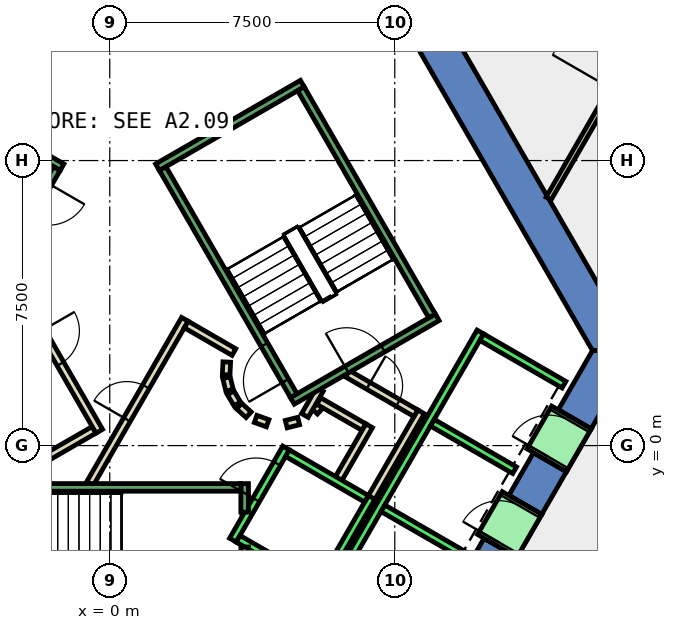
"""IFC4 building model, lengths in metres.
Left out: names, types, materials, properties, quantities, classifications, styles, units other than length and angle.
Written with IfcOpenShell. Run it as: python <this file> out.ifc"""

import sys

from ifc_helpers import new_model, si_unit, direction, frame, frame_2d, origin, place, context, subcontext, project, spatial, polyline, rectangle, outline, extrude, element, fill, save


model = new_model("IFC4")
c1 = context("Model", 3, precision=1e-05, world=origin(), true_north=direction((0.0, 1.0)))
c2 = subcontext(c1, "Body", "Model", "MODEL_VIEW")
j1 = project(units=[si_unit("LENGTHUNIT", "METRE"), si_unit("PLANEANGLEUNIT", "RADIAN")], contexts=[c1])
p1 = place(None, origin())
s1 = spatial("IfcSite", under=j1, at=p1, CompositionType="ELEMENT")
p2 = place(p1, origin())
s2 = spatial("IfcBuilding", under=s1, at=p2, CompositionType="ELEMENT")
p3 = place(p2, frame((0.0, 0.0, 30.0)))
s3 = spatial("IfcBuildingStorey", under=s2, at=p3, CompositionType="ELEMENT", Elevation=30.0)
p4 = place(p3, frame((0.0, 0.0, -0.45)))
e1 = element("IfcWall", 1, at=p4, inside=s3, PredefinedType="SHEAR", context=c2, shape_type="SweptSolid", body=[
    extrude(outline(polyline([(8.517, 11.748), (7.651, 11.248), (12.702, 2.5), (13.856, 2.5), (8.517, 11.748)])), origin(), (0.0, 0.0, 1.0), 4.85),
])
p5 = place(p3, frame((0.0, 0.0, -0.45)))
e2 = element("IfcWall", 2, at=p5, inside=s3, PredefinedType="SHEAR", context=c2, shape_type="SweptSolid", body=[
    extrude(outline(polyline([(10.717, -2.937), (9.851, -2.437), (9.201, -3.563), (10.067, -4.063), (10.717, -2.937)])), origin(), (0.0, 0.0, 1.0), 4.85),
])
p6 = place(p3, frame((0.0, 0.0, -0.45)))
e3 = element("IfcWall", 3, at=p6, inside=s3, PredefinedType="SHEAR", context=c2, shape_type="SweptSolid", body=[
    extrude(outline(polyline([(12.017, -0.686), (11.151, -0.186), (10.501, -1.311), (11.367, -1.811), (12.017, -0.686)])), origin(), (0.0, 0.0, 1.0), 4.85),
])
p7 = place(p3, frame((0.0, 0.0, -0.45)))
e4 = element("IfcWall", 4, at=p7, inside=s3, PredefinedType="SHEAR", context=c2, shape_type="SweptSolid", body=[
    extrude(outline(polyline([(11.801, 0.94), (12.667, 0.44), (13.856, 2.5), (12.702, 2.5), (11.801, 0.94)])), origin(), (0.0, 0.0, 1.0), 4.85),
])
p8 = place(p3, frame((0.0, 0.0, 3.6)))
e5 = element("IfcWall", 5, at=p8, inside=s3, PredefinedType="SHEAR", context=c2, shape_type="SweptSolid", body=[
    extrude(outline(polyline([(11.367, -1.811), (10.501, -1.311), (9.851, -2.437), (10.717, -2.937), (11.367, -1.811)])), origin(), (0.0, 0.0, 1.0), 0.8),
])
p9 = place(p3, frame((0.0, 0.0, 3.6)))
e6 = element("IfcWall", 6, at=p9, inside=s3, PredefinedType="SHEAR", context=c2, shape_type="SweptSolid", body=[
    extrude(outline(polyline([(12.667, 0.44), (11.801, 0.94), (11.151, -0.186), (12.017, -0.686), (12.667, 0.44)])), origin(), (0.0, 0.0, 1.0), 0.8),
])
p10 = place(p3, frame((5.39, 0.898, 0.0), z_axis=(0.0, 0.0, 1.0), x_axis=(0.673828488714, 0.738887791073, 0.0)))
e7 = element("IfcWall", 7, at=p10, inside=s3, PredefinedType="PARTITIONING", context=c2, shape_type="SweptSolid", body=[
    extrude(rectangle(XDim=0.263, YDim=0.2, at=frame_2d((0.131, 0.0))), origin(), (0.0, 0.0, 1.0), 4.4),
])
p11 = place(p3, frame((5.499, 1.172, 0.0), z_axis=(0.0, 0.0, 1.0), x_axis=(0.866333505267, -0.499465972466, 0.0)))
e8 = element("IfcWall", 8, at=p11, inside=s3, PredefinedType="PARTITIONING", context=c2, shape_type="SweptSolid", body=[
    extrude(rectangle(XDim=1.374, YDim=0.2, at=frame_2d((0.687, 0.0))), origin(), (0.0, 0.0, 1.0), 4.4),
])
p12 = place(p3, frame((6.826, 0.522, 0.0), z_axis=(0.0, 0.0, 1.0), x_axis=(-0.500016722714, -0.866015748706, 0.0)))
e9 = element("IfcWall", 9, at=p12, inside=s3, PredefinedType="PARTITIONING", context=c2, shape_type="SweptSolid", body=[
    extrude(rectangle(XDim=1.7, YDim=0.2, at=frame_2d((0.85, 0.0))), origin(), (0.0, 0.0, 1.0), 4.4),
])
p13 = place(p3, frame((8.192, 0.888, 0.0), z_axis=(0.0, 0.0, 1.0), x_axis=(-0.499940625693, -0.866059680843, 0.0)))
e10 = element("IfcWall", 10, at=p13, inside=s3, PredefinedType="PARTITIONING", context=c2, shape_type="SweptSolid", body=[
    extrude(rectangle(XDim=2.68, YDim=0.2, at=frame_2d((1.34, 0.0))), origin(), (0.0, 0.0, 1.0), 4.4),
])
p14 = place(p3, frame((5.135, 0.793, 0.0), z_axis=(0.0, 0.0, 1.0), x_axis=(0.499526442893, 0.866298639529, 0.0)))
e11 = element("IfcWall", 11, at=p14, inside=s3, PredefinedType="PARTITIONING", context=c2, shape_type="SweptSolid", body=[
    extrude(rectangle(XDim=0.791, YDim=0.2, at=frame_2d((0.396, 0.0))), origin(), (0.0, 0.0, 1.0), 4.4),
])
p15 = place(p3, frame((6.25, 1.894, 0.0), z_axis=(0.0, 0.0, 1.0), x_axis=(0.866043184279, -0.499969202016, 0.0)))
e12 = element("IfcWall", 12, at=p15, inside=s3, PredefinedType="PARTITIONING", context=c2, shape_type="SweptSolid", body=[
    extrude(rectangle(XDim=2.084, YDim=0.2, at=frame_2d((1.042, 0.0))), origin(), (0.0, 0.0, 1.0), 4.4),
])
p16 = place(p15, frame((0.642, 0.0, 0.0)))
e13 = element("IfcOpeningElement", 13, at=p16, cuts=e12, PredefinedType="OPENING", context=c2, shape_type="SweptSolid", body=[
    extrude(rectangle(XDim=0.9, YDim=2.1, at=frame_2d((0.45, 1.05))), frame((0.0, 0.11, 0.0), z_axis=(0.0, -1.0, 0.0), x_axis=(1.0, 0.0, 0.0)), (0.0, 0.0, 1.0), 0.22),
])
p17 = place(p3, frame((3.079, 2.199, 0.0), z_axis=(0.0, 0.0, 1.0), x_axis=(-0.047771483479, -0.998858290933, 0.0)))
e14 = element("IfcWall", 14, at=p17, inside=s3, PredefinedType="PARTITIONING", context=c2, shape_type="SweptSolid", body=[
    extrude(rectangle(XDim=0.337, YDim=0.2, at=frame_2d((0.169, 0.0))), origin(), (0.0, 0.0, 1.0), 4.4),
])
p18 = place(p3, frame((3.07, 1.786, 0.0), z_axis=(0.0, 0.0, 1.0), x_axis=(0.242705583207, -0.970099994784, 0.0)))
e15 = element("IfcWall", 15, at=p18, inside=s3, PredefinedType="PARTITIONING", context=c2, shape_type="SweptSolid", body=[
    extrude(rectangle(XDim=0.338, YDim=0.2, at=frame_2d((0.169, 0.0))), origin(), (0.0, 0.0, 1.0), 4.4),
])
for number, where, z_axis, x_axis in (
    (16, (3.182, 1.388, 0.0), (0.0, 0.0, 1.0), (0.512, -0.859, 0.0)),
    (17, (3.404, 1.039, 0.0), (0.0, 0.0, 1.0), (0.74, -0.672, 0.0)),
):
    element("IfcWall", number, at=place(p3, frame(where, z_axis=z_axis, x_axis=x_axis)), inside=s3, PredefinedType="PARTITIONING", context=c2, shape_type="SweptSolid", body=[
        extrude(rectangle(XDim=0.338, YDim=0.2, at=frame_2d((0.169, 0.0))), origin(), (0.0, 0.0, 1.0), 4.4),
    ])
p19 = place(p3, frame((3.838, 0.702, 0.0), z_axis=(0.0, 0.0, 1.0), x_axis=(0.941035081519, -0.338308993895, 0.0)))
e18 = element("IfcWall", 18, at=p19, inside=s3, PredefinedType="PARTITIONING", context=c2, shape_type="SweptSolid", body=[
    extrude(rectangle(XDim=0.337, YDim=0.2, at=frame_2d((0.168, 0.0))), origin(), (0.0, 0.0, 1.0), 4.4),
])
p20 = place(p3, frame((4.644, 0.564, 0.0), z_axis=(0.0, 0.0, 1.0), x_axis=(0.969929076366, 0.243387729394, 0.0)))
e19 = element("IfcWall", 19, at=p20, inside=s3, PredefinedType="PARTITIONING", context=c2, shape_type="SweptSolid", body=[
    extrude(rectangle(XDim=0.337, YDim=0.2, at=frame_2d((0.168, 0.0))), origin(), (0.0, 0.0, 1.0), 4.4),
])
p21 = place(p3, frame((-0.52, -1.0, 0.0), z_axis=(0.0, 0.0, 1.0), x_axis=(0.50011622646, 0.865958290007, 0.0)))
e20 = element("IfcWall", 20, at=p21, inside=s3, PredefinedType="PARTITIONING", context=c2, shape_type="SweptSolid", body=[
    extrude(rectangle(XDim=4.991, YDim=0.2, at=frame_2d((2.496, 0.0))), origin(), (0.0, 0.0, 1.0), 4.4),
])
p22 = place(p21, frame((1.945, 0.0, 0.0)))
e21 = element("IfcOpeningElement", 21, at=p22, cuts=e20, PredefinedType="OPENING", context=c2, shape_type="SweptSolid", body=[
    extrude(rectangle(XDim=1.0, YDim=2.1, at=frame_2d((0.5, 1.05))), frame((0.0, 0.11, 0.0), z_axis=(0.0, -1.0, 0.0), x_axis=(1.0, 0.0, 0.0)), (0.0, 0.0, 1.0), 0.22),
])
p23 = place(p3, frame((2.012, 3.186, 0.0), z_axis=(0.0, 0.0, 1.0), x_axis=(0.865891012941, -0.500232699559, 0.0)))
e22 = element("IfcWall", 22, at=p23, inside=s3, PredefinedType="PARTITIONING", context=c2, shape_type="SweptSolid", body=[
    extrude(rectangle(XDim=1.449, YDim=0.2, at=frame_2d((0.725, 0.0))), origin(), (0.0, 0.0, 1.0), 4.4),
])
p24 = place(p3, frame((-0.412, 0.414, 0.0), z_axis=(0.0, 0.0, 1.0), x_axis=(-0.866017369001, -0.500013916395, 0.0)))
e23 = element("IfcWall", 23, at=p24, inside=s3, PredefinedType="PARTITIONING", context=c2, shape_type="SweptSolid", body=[
    extrude(rectangle(XDim=1.45, YDim=0.2, at=frame_2d((0.725, 0.0))), origin(), (0.0, 0.0, 1.0), 4.4),
])
p25 = place(p3, frame((-2.771, 4.7, 0.0), z_axis=(0.0, 0.0, 1.0), x_axis=(0.499969479948, -0.866043023828, 0.0)))
e24 = element("IfcWall", 24, at=p25, inside=s3, PredefinedType="PARTITIONING", context=c2, shape_type="SweptSolid", body=[
    extrude(rectangle(XDim=4.99, YDim=0.2, at=frame_2d((2.495, 0.0))), origin(), (0.0, 0.0, 1.0), 4.4),
])
p26 = place(p25, frame((1.945, 0.0, 0.0)))
e25 = element("IfcOpeningElement", 25, at=p26, cuts=e24, PredefinedType="OPENING", context=c2, shape_type="SweptSolid", body=[
    extrude(rectangle(XDim=1.0, YDim=2.1, at=frame_2d((0.5, 1.05))), frame((0.0, 0.11, 0.0), z_axis=(0.0, -1.0, 0.0), x_axis=(1.0, 0.0, 0.0)), (0.0, 0.0, 1.0), 0.22),
])
p27 = place(p3, frame((11.547, 6.5, 0.0), z_axis=(0.0, 0.0, 1.0), x_axis=(0.500020059357, 0.866013822199, 0.0)))
e26 = element("IfcWall", 26, at=p27, inside=s3, PredefinedType="PARTITIONING", context=c2, shape_type="SweptSolid", body=[
    extrude(rectangle(XDim=8.356, YDim=0.15, at=frame_2d((4.178, 0.0))), origin(), (0.0, 0.0, 1.0), 4.4),
])
p28 = place(p27, frame((3.33, 0.0, 0.0)))
e27 = element("IfcOpeningElement", 27, at=p28, cuts=e26, PredefinedType="OPENING", context=c2, shape_type="SweptSolid", body=[
    extrude(rectangle(XDim=1.8, YDim=2.1, at=frame_2d((0.9, 1.05))), frame((0.0, 0.085, 0.0), z_axis=(0.0, -1.0, 0.0), x_axis=(1.0, 0.0, 0.0)), (0.0, 0.0, 1.0), 0.17),
])
p29 = place(p3, frame((3.24, -2.488, 0.0), z_axis=(0.0, 0.0, 1.0), x_axis=(0.49994636267, 0.866056369097, 0.0)))
e28 = element("IfcWall", 28, at=p29, inside=s3, PredefinedType="STANDARD", context=c2, shape_type="SweptSolid", body=[
    extrude(rectangle(XDim=2.8, YDim=0.2, at=frame_2d((1.4, 0.0))), origin(), (0.0, 0.0, 1.0), 4.4),
])
p30 = place(p29, frame((1.225, 0.0, 0.0)))
e29 = element("IfcOpeningElement", 29, at=p30, cuts=e28, PredefinedType="OPENING", context=c2, shape_type="SweptSolid", body=[
    extrude(rectangle(XDim=1.1, YDim=2.1, at=frame_2d((0.55, 1.05))), frame((0.0, 0.11, 0.0), z_axis=(0.0, -1.0, 0.0), x_axis=(1.0, 0.0, 0.0)), (0.0, 0.0, 1.0), 0.22),
])
p31 = place(p3, frame((5.492, -3.788, 0.0), z_axis=(0.0, 0.0, 1.0), x_axis=(0.500011755427, 0.866018616679, 0.0)))
e30 = element("IfcWall", 30, at=p31, inside=s3, PredefinedType="STANDARD", context=c2, shape_type="SweptSolid", body=[
    extrude(rectangle(XDim=2.8, YDim=0.2, at=frame_2d((1.4, 0.0))), origin(), (0.0, 0.0, 1.0), 4.4),
])
p32 = place(p3, frame((3.377, -2.452, 0.0), z_axis=(0.0, 0.0, 1.0), x_axis=(0.865955154139, -0.50012165622, 0.0)))
e31 = element("IfcWall", 31, at=p32, inside=s3, PredefinedType="STANDARD", context=c2, shape_type="SweptSolid", body=[
    extrude(rectangle(XDim=2.4, YDim=0.2, at=frame_2d((1.2, 0.0))), origin(), (0.0, 0.0, 1.0), 4.4),
])
p33 = place(p3, frame((4.677, -0.2, 0.0), z_axis=(0.0, 0.0, 1.0), x_axis=(0.865973769406, -0.500089422704, 0.0)))
e32 = element("IfcWall", 32, at=p33, inside=s3, PredefinedType="STANDARD", context=c2, shape_type="SweptSolid", body=[
    extrude(rectangle(XDim=2.399, YDim=0.2, at=frame_2d((1.2, 0.0))), origin(), (0.0, 0.0, 1.0), 4.4),
])
p34 = place(p3, frame((4.451, -6.19, 0.0), z_axis=(0.0, 0.0, 1.0), x_axis=(0.50000090737, 0.866024879913, 0.0)))
e33 = element("IfcWall", 33, at=p34, inside=s3, PredefinedType="STANDARD", context=c2, shape_type="SweptSolid", body=[
    extrude(rectangle(XDim=10.6, YDim=0.2, at=frame_2d((5.3, 0.0))), origin(), (0.0, 0.0, 1.0), 4.4),
])
for number, where, z_axis, x_axis in (
    (34, (7.188, -1.65, 0.0), (0.0, 0.0, 1.0), (0.866, -0.5, 0.0)),
    (35, (8.488, 0.602, 0.0), (0.0, 0.0, 1.0), (0.866, -0.5, 0.0)),
):
    element("IfcWall", number, at=place(p3, frame(where, z_axis=z_axis, x_axis=x_axis)), inside=s3, PredefinedType="STANDARD", context=c2, shape_type="SweptSolid", body=[
        extrude(rectangle(XDim=2.5, YDim=0.2, at=frame_2d((1.25, 0.0))), origin(), (0.0, 0.0, 1.0), 4.4),
    ])
p35 = place(p3, frame((9.788, 2.853, 0.0), z_axis=(0.0, 0.0, 1.0), x_axis=(0.865998541277, -0.500046524342, 0.0)))
e36 = element("IfcWall", 36, at=p35, inside=s3, PredefinedType="STANDARD", context=c2, shape_type="SweptSolid", body=[
    extrude(rectangle(XDim=2.5, YDim=0.2, at=frame_2d((1.25, 0.0))), origin(), (0.0, 0.0, 1.0), 4.4),
])
p36 = place(p3, frame((10.198, -2.637, 0.0), z_axis=(0.0, 0.0, 1.0), x_axis=(0.49989585183, 0.866085525409, 0.0)))
e37 = element("IfcWall", 37, at=p36, inside=s3, PredefinedType="STANDARD", context=c2, shape_type="SweptSolid", body=[
    extrude(rectangle(XDim=1.3, YDim=1.2, at=frame_2d((0.65, 0.0))), origin(), (0.0, 0.0, 1.0), 2.4),
])
p37 = place(p36, frame((0.1, 0.0, 0.0)))
e38 = element("IfcOpeningElement", 38, at=p37, cuts=e37, PredefinedType="OPENING", context=c2, shape_type="SweptSolid", body=[
    extrude(rectangle(XDim=1.1, YDim=2.3, at=frame_2d((0.55, 1.15))), frame((0.0, 0.61, 0.0), z_axis=(0.0, -1.0, 0.0), x_axis=(1.0, 0.0, 0.0)), (0.0, 0.0, 1.0), 1.22),
])
p38 = place(p3, frame((11.498, -0.385, 0.0), z_axis=(0.0, 0.0, 1.0), x_axis=(0.500221244143, 0.865897630733, 0.0)))
e39 = element("IfcWall", 39, at=p38, inside=s3, PredefinedType="STANDARD", context=c2, shape_type="SweptSolid", body=[
    extrude(rectangle(XDim=1.299, YDim=1.2, at=frame_2d((0.65, 0.0))), origin(), (0.0, 0.0, 1.0), 2.4),
])
p39 = place(p38, frame((0.1, 0.0, 0.0)))
e40 = element("IfcOpeningElement", 40, at=p39, cuts=e39, PredefinedType="OPENING", context=c2, shape_type="SweptSolid", body=[
    extrude(rectangle(XDim=1.1, YDim=2.3, at=frame_2d((0.55, 1.15))), frame((0.0, 0.61, 0.0), z_axis=(0.0, -1.0, 0.0), x_axis=(1.0, 0.0, 0.0)), (0.0, 0.0, 1.0), 1.22),
])
p40 = place(p3, frame((3.55, -2.667, 0.0), z_axis=(0.0, 0.0, 1.0), x_axis=(0.0, -1.0, 0.0)))
e41 = element("IfcWall", 41, at=p40, inside=s3, PredefinedType="STANDARD", context=c2, shape_type="SweptSolid", body=[
    extrude(rectangle(XDim=2.733, YDim=0.2, at=frame_2d((1.366, 0.0))), origin(), (0.0, 0.0, 1.0), 4.4),
])
p41 = place(p3, frame((3.55, -1.0, 0.0), z_axis=(0.0, 0.0, 1.0), x_axis=(0.0, -1.0, 0.0)))
e42 = element("IfcWall", 42, at=p41, inside=s3, PredefinedType="STANDARD", context=c2, shape_type="SweptSolid", body=[
    extrude(rectangle(XDim=0.751, YDim=0.2, at=frame_2d((0.375, 0.0))), origin(), (0.0, 0.0, 1.0), 4.4),
])
p42 = place(p3, frame((-3.45, -1.1, 0.0), z_axis=(0.0, 0.0, 1.0), x_axis=(1.0, 0.0, 0.0)))
e43 = element("IfcWall", 43, at=p42, inside=s3, PredefinedType="STANDARD", context=c2, shape_type="SweptSolid", body=[
    extrude(rectangle(XDim=6.9, YDim=0.2, at=frame_2d((3.45, 0.0))), origin(), (0.0, 0.0, 1.0), 4.4),
])
p43 = place(p42, frame((0.45, 0.0, 0.0)))
e44 = element("IfcOpeningElement", 44, at=p43, cuts=e43, PredefinedType="OPENING", context=c2, shape_type="SweptSolid", body=[
    extrude(rectangle(XDim=1.1, YDim=2.2, at=frame_2d((0.55, 1.1))), frame((0.0, 0.11, 0.0), z_axis=(0.0, -1.0, 0.0), x_axis=(1.0, 0.0, 0.0)), (0.0, 0.0, 1.0), 0.22),
])
p44 = place(p3, frame((4.806, 1.176, 0.0), z_axis=(0.0, 0.0, 1.0), x_axis=(0.866059941101, 0.499940174841, 0.0)))
e45 = element("IfcWall", 45, at=p44, inside=s3, PredefinedType="STANDARD", context=c2, shape_type="SweptSolid", body=[
    extrude(rectangle(XDim=4.4, YDim=0.2, at=frame_2d((2.2, 0.0))), origin(), (0.0, 0.0, 1.0), 4.4),
])
p45 = place(p44, frame((1.65, 0.0, 0.0)))
e46 = element("IfcOpeningElement", 46, at=p45, cuts=e45, PredefinedType="OPENING", context=c2, shape_type="SweptSolid", body=[
    extrude(rectangle(XDim=1.1, YDim=2.2, at=frame_2d((0.55, 1.1))), frame((0.0, 0.11, 0.0), z_axis=(0.0, -1.0, 0.0), x_axis=(1.0, 0.0, 0.0)), (0.0, 0.0, 1.0), 0.22),
])
p46 = place(p3, frame((1.256, 7.324, 0.0), z_axis=(0.0, 0.0, 1.0), x_axis=(0.866046073146, 0.499964197906, 0.0)))
e47 = element("IfcWall", 47, at=p46, inside=s3, PredefinedType="STANDARD", context=c2, shape_type="SweptSolid", body=[
    extrude(rectangle(XDim=4.4, YDim=0.2, at=frame_2d((2.2, 0.0))), origin(), (0.0, 0.0, 1.0), 4.4),
])
p47 = place(p3, frame((4.843, 1.312, 0.0), z_axis=(0.0, 0.0, 1.0), x_axis=(-0.499963383562, 0.866046543262, 0.0)))
e48 = element("IfcWall", 48, at=p47, inside=s3, PredefinedType="STANDARD", context=c2, shape_type="SweptSolid", body=[
    extrude(rectangle(XDim=6.9, YDim=0.2, at=frame_2d((3.45, 0.0))), origin(), (0.0, 0.0, 1.0), 4.4),
])
p48 = place(p47, frame((0.45, 0.0, 0.0)))
e49 = element("IfcOpeningElement", 49, at=p48, cuts=e48, PredefinedType="OPENING", context=c2, shape_type="SweptSolid", body=[
    extrude(rectangle(XDim=1.1, YDim=2.2, at=frame_2d((0.55, 1.1))), frame((0.0, 0.11, 0.0), z_axis=(0.0, -1.0, 0.0), x_axis=(1.0, 0.0, 0.0)), (0.0, 0.0, 1.0), 0.22),
])
p49 = place(p3, frame((8.48, 3.412, 0.0), z_axis=(0.0, 0.0, 1.0), x_axis=(-0.499978703459, 0.866037698999, 0.0)))
e50 = element("IfcWall", 50, at=p49, inside=s3, PredefinedType="STANDARD", context=c2, shape_type="SweptSolid", body=[
    extrude(rectangle(XDim=6.9, YDim=0.2, at=frame_2d((3.45, 0.0))), origin(), (0.0, 0.0, 1.0), 4.4),
])
p50 = place(p3, frame((-1.256, 7.324, 0.0), z_axis=(0.0, 0.0, 1.0), x_axis=(-0.866046073146, 0.499964197906, 0.0)))
e51 = element("IfcWall", 51, at=p50, inside=s3, PredefinedType="STANDARD", context=c2, shape_type="SweptSolid", body=[
    extrude(rectangle(XDim=4.4, YDim=0.2, at=frame_2d((2.2, 0.0))), origin(), (0.0, 0.0, 1.0), 4.4),
])
p51 = place(p50, frame((1.65, 0.0, 0.0)))
e52 = element("IfcOpeningElement", 52, at=p51, cuts=e51, PredefinedType="OPENING", context=c2, shape_type="SweptSolid", body=[
    extrude(rectangle(XDim=1.1, YDim=2.2, at=frame_2d((0.55, 1.1))), frame((0.0, 0.11, 0.0), z_axis=(0.0, -1.0, 0.0), x_axis=(1.0, 0.0, 0.0)), (0.0, 0.0, 1.0), 0.22),
])
p52 = place(p3, frame((-1.393, 7.288, 0.0), z_axis=(0.0, 0.0, 1.0), x_axis=(-0.499963383562, -0.866046543262, 0.0)))
e53 = element("IfcWall", 53, at=p52, inside=s3, PredefinedType="STANDARD", context=c2, shape_type="SweptSolid", body=[
    extrude(rectangle(XDim=6.9, YDim=0.2, at=frame_2d((3.45, 0.0))), origin(), (0.0, 0.0, 1.0), 4.4),
])
p53 = place(p52, frame((0.45, 0.0, 0.0)))
e54 = element("IfcOpeningElement", 54, at=p53, cuts=e53, PredefinedType="OPENING", context=c2, shape_type="SweptSolid", body=[
    extrude(rectangle(XDim=1.1, YDim=2.2, at=frame_2d((0.55, 1.1))), frame((0.0, 0.11, 0.0), z_axis=(0.0, -1.0, 0.0), x_axis=(1.0, 0.0, 0.0)), (0.0, 0.0, 1.0), 0.22),
])
p54 = place(p22, origin())
e55 = element("IfcDoor", 55, at=p54, inside=s3, OperationType="SINGLE_SWING_LEFT", PredefinedType="DOOR", context=c2, shape_type="SweptSolid", body=[
    extrude(rectangle(XDim=1.0, YDim=2.1, at=frame_2d((0.5, 1.05))), frame((0.0, 0.025, 0.0), z_axis=(0.0, -1.0, 0.0), x_axis=(1.0, 0.0, 0.0)), (0.0, 0.0, 1.0), 0.05),
])
fill(e21, e55)
p55 = place(p26, origin())
e56 = element("IfcDoor", 56, at=p55, inside=s3, OperationType="SINGLE_SWING_RIGHT", PredefinedType="DOOR", context=c2, shape_type="SweptSolid", body=[
    extrude(rectangle(XDim=1.0, YDim=2.1, at=frame_2d((0.5, 1.05))), frame((0.0, 0.025, 0.0), z_axis=(0.0, -1.0, 0.0), x_axis=(1.0, 0.0, 0.0)), (0.0, 0.0, 1.0), 0.05),
])
fill(e25, e56)
p56 = place(p16, origin())
e57 = element("IfcDoor", 57, at=p56, inside=s3, OperationType="SINGLE_SWING_LEFT", PredefinedType="DOOR", context=c2, shape_type="SweptSolid", body=[
    extrude(rectangle(XDim=0.9, YDim=2.1, at=frame_2d((0.45, 1.05))), frame((0.0, 0.025, 0.0), z_axis=(0.0, -1.0, 0.0), x_axis=(1.0, 0.0, 0.0)), (0.0, 0.0, 1.0), 0.05),
])
fill(e13, e57)
p57 = place(p37, origin())
e58 = element("IfcDoor", 58, at=p57, inside=s3, OperationType="SLIDING_TO_LEFT", PredefinedType="DOOR", context=c2, shape_type="SweptSolid", body=[
    extrude(rectangle(XDim=1.1, YDim=2.3, at=frame_2d((0.55, 1.15))), frame((0.0, 0.025, 0.0), z_axis=(0.0, -1.0, 0.0), x_axis=(1.0, 0.0, 0.0)), (0.0, 0.0, 1.0), 0.05),
])
fill(e38, e58)
p58 = place(p39, origin())
e59 = element("IfcDoor", 59, at=p58, inside=s3, OperationType="SLIDING_TO_LEFT", PredefinedType="DOOR", context=c2, shape_type="SweptSolid", body=[
    extrude(rectangle(XDim=1.1, YDim=2.3, at=frame_2d((0.55, 1.15))), frame((0.0, 0.025, 0.0), z_axis=(0.0, -1.0, 0.0), x_axis=(1.0, 0.0, 0.0)), (0.0, 0.0, 1.0), 0.05),
])
fill(e40, e59)
p59 = place(p30, origin())
e60 = element("IfcDoor", 60, at=p59, inside=s3, OperationType="SLIDING_TO_LEFT", PredefinedType="DOOR", context=c2, shape_type="SweptSolid", body=[
    extrude(rectangle(XDim=1.1, YDim=2.1, at=frame_2d((0.55, 1.05))), frame((0.0, 0.025, 0.0), z_axis=(0.0, -1.0, 0.0), x_axis=(1.0, 0.0, 0.0)), (0.0, 0.0, 1.0), 0.05),
])
fill(e29, e60)
p60 = place(p48, origin())
e61 = element("IfcDoor", 61, at=p60, inside=s3, OperationType="SINGLE_SWING_LEFT", PredefinedType="DOOR", context=c2, shape_type="SweptSolid", body=[
    extrude(rectangle(XDim=1.1, YDim=2.2, at=frame_2d((0.55, 1.1))), frame((0.0, 0.025, 0.0), z_axis=(0.0, -1.0, 0.0), x_axis=(1.0, 0.0, 0.0)), (0.0, 0.0, 1.0), 0.05),
])
fill(e49, e61)
p61 = place(p45, origin())
e62 = element("IfcDoor", 62, at=p61, inside=s3, OperationType="SINGLE_SWING_LEFT", PredefinedType="DOOR", context=c2, shape_type="SweptSolid", body=[
    extrude(rectangle(XDim=1.1, YDim=2.2, at=frame_2d((0.55, 1.1))), frame((0.0, 0.025, 0.0), z_axis=(0.0, -1.0, 0.0), x_axis=(1.0, 0.0, 0.0)), (0.0, 0.0, 1.0), 0.05),
])
fill(e46, e62)
save(model, sys.argv[1])
